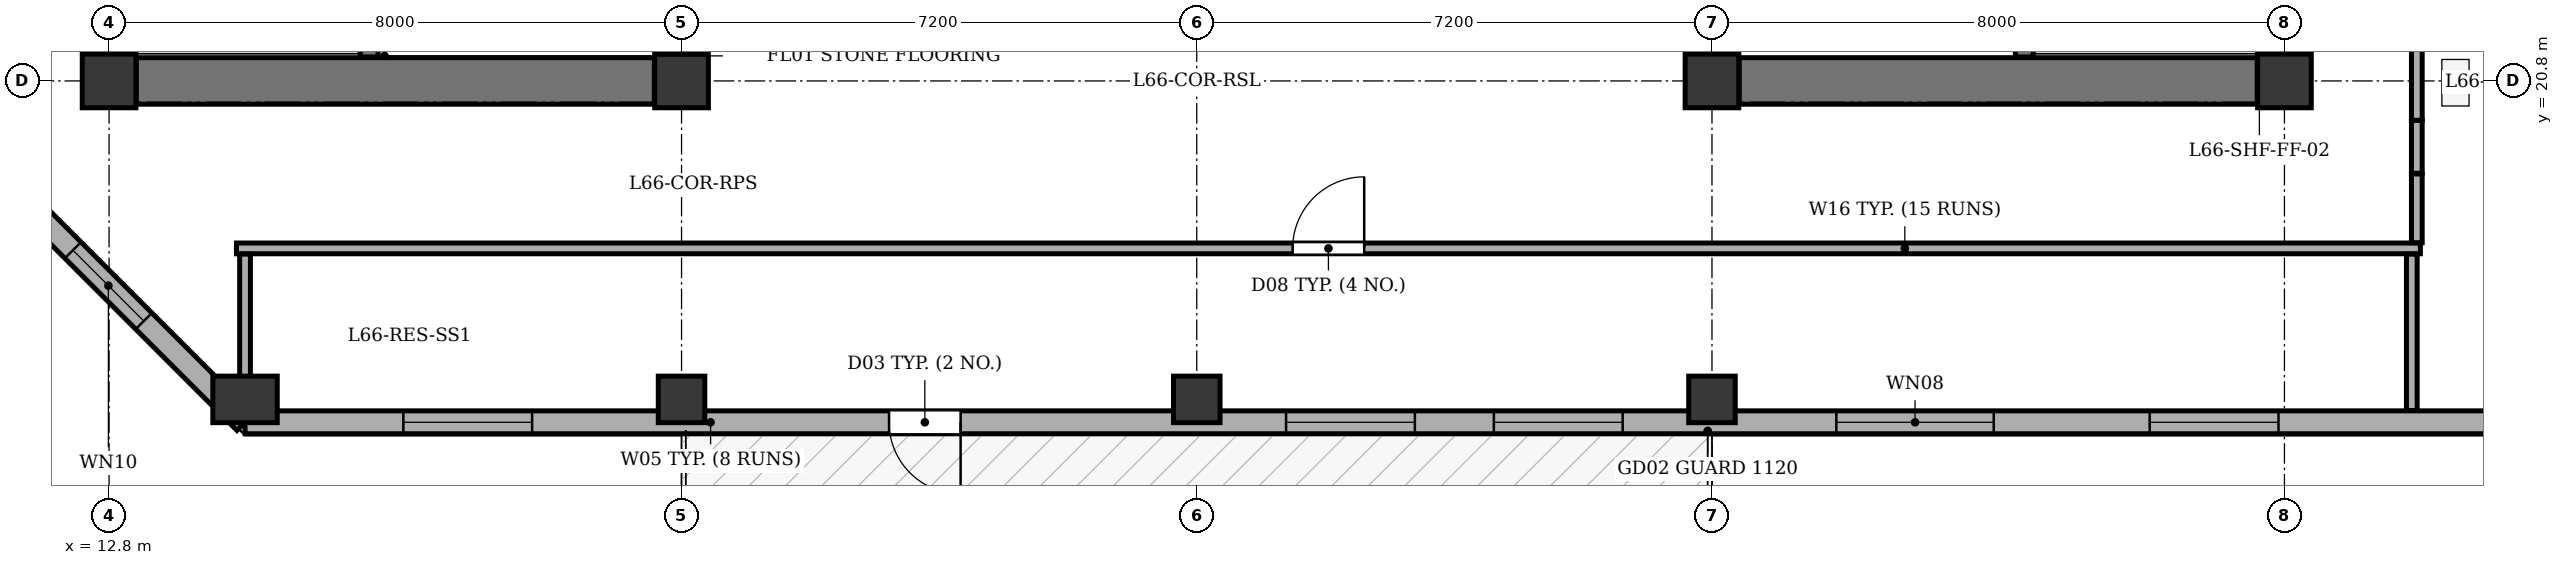
"""IFC4 building model, lengths in metres.
Left out: names, types, materials, properties, quantities, classifications, styles, units other than length and angle.
Written with IfcOpenShell. Run it as: python <this file> out.ifc"""

import sys

from ifc_helpers import new_model, si_unit, direction, frame, frame_2d, origin, origin_2d, place, context, subcontext, project, spatial, rectangle, extrude, element, fill, save


model = new_model("IFC4")
c1 = context("Model", 3, precision=1e-05, world=origin(), true_north=direction((0.0, 1.0)))
c2 = subcontext(c1, "Body", "Model", "MODEL_VIEW")
j1 = project(units=[si_unit("LENGTHUNIT", "METRE"), si_unit("PLANEANGLEUNIT", "RADIAN")], contexts=[c1])
p1 = place(None, origin())
s1 = spatial("IfcSite", under=j1, at=p1, CompositionType="ELEMENT")
p2 = place(p1, origin())
s2 = spatial("IfcBuilding", under=s1, at=p2, CompositionType="ELEMENT")
p3 = place(p2, frame((0.0, 0.0, 251.7)))
s3 = spatial("IfcBuildingStorey", under=s2, at=p3, CompositionType="ELEMENT", Elevation=251.7)
for number, where, z_axis, x_axis in (
    (1, (12.8, 20.8, 0.0), (0.0, 0.0, 1.0), (1.0, 0.0, 0.0)),
    (2, (20.8, 20.8, 0.0), (0.0, 0.0, 1.0), (1.0, 0.0, 0.0)),
    (3, (35.2, 20.8, 0.0), (0.0, 0.0, 1.0), (1.0, 0.0, 0.0)),
    (4, (43.2, 20.8, 0.0), (0.0, 0.0, 1.0), (1.0, 0.0, 0.0)),
):
    element("IfcColumn", number, at=place(p3, frame(where, z_axis=z_axis, x_axis=x_axis)), inside=s3, PredefinedType="COLUMN", context=c2, shape_type="SweptSolid", body=[
        extrude(rectangle(XDim=0.75, YDim=0.75, at=origin_2d()), origin(), (0.0, 0.0, 1.0), 3.4),
    ])
p4 = place(p3, frame((14.7, 16.35, 0.0), z_axis=(0.0, 0.0, 1.0), x_axis=(1.0, 0.0, 0.0)))
e5 = element("IfcColumn", 5, at=p4, inside=s3, PredefinedType="COLUMN", context=c2, shape_type="SweptSolid", body=[
    extrude(rectangle(XDim=0.65, YDim=0.9, at=origin_2d()), origin(), (0.0, 0.0, 1.0), 3.4),
])
for number, where, z_axis, x_axis in (
    (6, (20.8, 16.35, 0.0), (0.0, 0.0, 1.0), (1.0, 0.0, 0.0)),
    (7, (28.0, 16.35, 0.0), (0.0, 0.0, 1.0), (1.0, 0.0, 0.0)),
    (8, (35.2, 16.35, 0.0), (0.0, 0.0, 1.0), (1.0, 0.0, 0.0)),
):
    element("IfcColumn", number, at=place(p3, frame(where, z_axis=z_axis, x_axis=x_axis)), inside=s3, PredefinedType="COLUMN", context=c2, shape_type="SweptSolid", body=[
        extrude(rectangle(XDim=0.65, YDim=0.65, at=origin_2d()), origin(), (0.0, 0.0, 1.0), 3.4),
    ])
p5 = place(p3, frame((51.7, 16.03, 0.0), z_axis=(0.0, 0.0, 1.0), x_axis=(-1.0, 0.0, 0.0)))
e9 = element("IfcWall", 9, at=p5, inside=s3, PredefinedType="STANDARD", context=c2, shape_type="SweptSolid", body=[
    extrude(rectangle(XDim=37.0, YDim=0.32, at=frame_2d((18.5, 0.0))), origin(), (0.0, 0.0, 1.0), 2.725),
])
p6 = place(p5, frame((27.0, 0.0, 0.0)))
e10 = element("IfcOpeningElement", 10, at=p6, cuts=e9, PredefinedType="OPENING", context=c2, shape_type="SweptSolid", body=[
    extrude(rectangle(XDim=1.0, YDim=2.02, at=frame_2d((0.5, 1.01))), frame((0.0, 0.17, 0.0), z_axis=(0.0, -1.0, 0.0), x_axis=(1.0, 0.0, 0.0)), (0.0, 0.0, 1.0), 0.34),
])
p7 = place(p5, frame((1.235, 0.0, 0.75)))
e11 = element("IfcOpeningElement", 11, at=p7, cuts=e9, PredefinedType="OPENING", context=c2, shape_type="SweptSolid", body=[
    extrude(rectangle(XDim=1.8, YDim=1.7, at=frame_2d((0.9, 0.85))), frame((0.0, 0.17, 0.0), z_axis=(0.0, -1.0, 0.0), x_axis=(1.0, 0.0, 0.0)), (0.0, 0.0, 1.0), 0.34),
])
p8 = place(p5, frame((3.885, 0.0, 0.75)))
e12 = element("IfcOpeningElement", 12, at=p8, cuts=e9, PredefinedType="OPENING", context=c2, shape_type="SweptSolid", body=[
    extrude(rectangle(XDim=1.8, YDim=1.7, at=frame_2d((0.9, 0.85))), frame((0.0, 0.17, 0.0), z_axis=(0.0, -1.0, 0.0), x_axis=(1.0, 0.0, 0.0)), (0.0, 0.0, 1.0), 0.34),
])
p9 = place(p5, frame((8.583, 0.0, 0.75)))
e13 = element("IfcOpeningElement", 13, at=p9, cuts=e9, PredefinedType="OPENING", context=c2, shape_type="SweptSolid", body=[
    extrude(rectangle(XDim=1.8, YDim=1.7, at=frame_2d((0.9, 0.85))), frame((0.0, 0.17, 0.0), z_axis=(0.0, -1.0, 0.0), x_axis=(1.0, 0.0, 0.0)), (0.0, 0.0, 1.0), 0.34),
])
p10 = place(p5, frame((12.562, 0.0, 0.75)))
e14 = element("IfcOpeningElement", 14, at=p10, cuts=e9, PredefinedType="OPENING", context=c2, shape_type="SweptSolid", body=[
    extrude(rectangle(XDim=2.2, YDim=1.7, at=frame_2d((1.1, 0.85))), frame((0.0, 0.17, 0.0), z_axis=(0.0, -1.0, 0.0), x_axis=(1.0, 0.0, 0.0)), (0.0, 0.0, 1.0), 0.34),
])
p11 = place(p5, frame((17.748, 0.0, 0.75)))
e15 = element("IfcOpeningElement", 15, at=p11, cuts=e9, PredefinedType="OPENING", context=c2, shape_type="SweptSolid", body=[
    extrude(rectangle(XDim=1.8, YDim=1.7, at=frame_2d((0.9, 0.85))), frame((0.0, 0.17, 0.0), z_axis=(0.0, -1.0, 0.0), x_axis=(1.0, 0.0, 0.0)), (0.0, 0.0, 1.0), 0.34),
])
p12 = place(p5, frame((20.652, 0.0, 0.75)))
e16 = element("IfcOpeningElement", 16, at=p12, cuts=e9, PredefinedType="OPENING", context=c2, shape_type="SweptSolid", body=[
    extrude(rectangle(XDim=1.8, YDim=1.7, at=frame_2d((0.9, 0.85))), frame((0.0, 0.17, 0.0), z_axis=(0.0, -1.0, 0.0), x_axis=(1.0, 0.0, 0.0)), (0.0, 0.0, 1.0), 0.34),
])
p13 = place(p5, frame((32.988, 0.0, 0.75)))
e17 = element("IfcOpeningElement", 17, at=p13, cuts=e9, PredefinedType="OPENING", context=c2, shape_type="SweptSolid", body=[
    extrude(rectangle(XDim=1.8, YDim=1.7, at=frame_2d((0.9, 0.85))), frame((0.0, 0.17, 0.0), z_axis=(0.0, -1.0, 0.0), x_axis=(1.0, 0.0, 0.0)), (0.0, 0.0, 1.0), 0.34),
])
p14 = place(p3, frame((14.7, 16.03, 0.0), z_axis=(0.0, 0.0, 1.0), x_axis=(-0.707106781187, 0.707106781187, 0.0)))
e18 = element("IfcWall", 18, at=p14, inside=s3, PredefinedType="STANDARD", context=c2, shape_type="SweptSolid", body=[
    extrude(rectangle(XDim=5.402, YDim=0.32, at=frame_2d((2.701, 0.0))), origin(), (0.0, 0.0, 1.0), 2.725),
])
p15 = place(p14, frame((2.001, 0.0, 0.75)))
e19 = element("IfcOpeningElement", 19, at=p15, cuts=e18, PredefinedType="OPENING", context=c2, shape_type="SweptSolid", body=[
    extrude(rectangle(XDim=1.4, YDim=1.65, at=frame_2d((0.7, 0.825))), frame((0.0, 0.17, 0.0), z_axis=(0.0, -1.0, 0.0), x_axis=(1.0, 0.0, 0.0)), (0.0, 0.0, 1.0), 0.34),
])
p16 = place(p3, frame((12.8, 21.18, 0.0), z_axis=(0.0, 0.0, 1.0), x_axis=(0.0, 1.0, 0.0)))
e20 = element("IfcWall", 20, at=p16, inside=s3, PredefinedType="SHEAR", context=c2, shape_type="SweptSolid", body=[
    extrude(rectangle(XDim=12.04, YDim=0.65, at=frame_2d((6.02, 0.0))), origin(), (0.0, 0.0, 1.0), 3.1),
])
p17 = place(p3, frame((13.18, 20.8, 0.0), z_axis=(0.0, 0.0, 1.0), x_axis=(1.0, 0.0, 0.0)))
e21 = element("IfcWall", 21, at=p17, inside=s3, PredefinedType="SHEAR", context=c2, shape_type="SweptSolid", body=[
    extrude(rectangle(XDim=7.24, YDim=0.65, at=frame_2d((3.62, 0.0))), origin(), (0.0, 0.0, 1.0), 3.1),
])
p18 = place(p3, frame((20.8, 21.18, 0.0), z_axis=(0.0, 0.0, 1.0), x_axis=(0.0, 1.0, 0.0)))
e22 = element("IfcWall", 22, at=p18, inside=s3, PredefinedType="SHEAR", context=c2, shape_type="SweptSolid", body=[
    extrude(rectangle(XDim=3.87, YDim=0.65, at=frame_2d((1.935, 0.0))), origin(), (0.0, 0.0, 1.0), 3.1),
])
p19 = place(p18, frame((1.42, 0.0, 0.0)))
e23 = element("IfcOpeningElement", 23, at=p19, cuts=e22, PredefinedType="OPENING", context=c2, shape_type="SweptSolid", body=[
    extrude(rectangle(XDim=1.2, YDim=2.15, at=frame_2d((0.6, 1.075))), frame((0.0, 0.335, 0.0), z_axis=(0.0, -1.0, 0.0), x_axis=(1.0, 0.0, 0.0)), (0.0, 0.0, 1.0), 0.67),
])
p20 = place(p3, frame((16.435, 21.135, 0.0), z_axis=(0.0, 0.0, 1.0), x_axis=(0.0, 1.0, 0.0)))
e24 = element("IfcWall", 24, at=p20, inside=s3, PredefinedType="SHEAR", context=c2, shape_type="SweptSolid", body=[
    extrude(rectangle(XDim=12.13, YDim=0.25, at=frame_2d((6.065, 0.0))), origin(), (0.0, 0.0, 1.0), 3.1),
])
p21 = place(p20, frame((0.515, 0.0, 0.0)))
e25 = element("IfcOpeningElement", 25, at=p21, cuts=e24, PredefinedType="OPENING", context=c2, shape_type="SweptSolid", body=[
    extrude(rectangle(XDim=1.2, YDim=2.15, at=frame_2d((0.6, 1.075))), frame((0.0, 0.135, 0.0), z_axis=(0.0, -1.0, 0.0), x_axis=(1.0, 0.0, 0.0)), (0.0, 0.0, 1.0), 0.27),
])
p22 = place(p20, frame((2.665, 0.0, 0.0)))
e26 = element("IfcOpeningElement", 26, at=p22, cuts=e24, PredefinedType="OPENING", context=c2, shape_type="SweptSolid", body=[
    extrude(rectangle(XDim=1.15, YDim=2.15, at=frame_2d((0.575, 1.075))), frame((0.0, 0.135, 0.0), z_axis=(0.0, -1.0, 0.0), x_axis=(1.0, 0.0, 0.0)), (0.0, 0.0, 1.0), 0.27),
])
p23 = place(p3, frame((43.2, 21.18, 0.0), z_axis=(0.0, 0.0, 1.0), x_axis=(0.0, 1.0, 0.0)))
e27 = element("IfcWall", 27, at=p23, inside=s3, PredefinedType="SHEAR", context=c2, shape_type="SweptSolid", body=[
    extrude(rectangle(XDim=12.04, YDim=0.65, at=frame_2d((6.02, 0.0))), origin(), (0.0, 0.0, 1.0), 3.1),
])
p24 = place(p3, frame((35.58, 20.8, 0.0), z_axis=(0.0, 0.0, 1.0), x_axis=(1.0, 0.0, 0.0)))
e28 = element("IfcWall", 28, at=p24, inside=s3, PredefinedType="SHEAR", context=c2, shape_type="SweptSolid", body=[
    extrude(rectangle(XDim=7.24, YDim=0.65, at=frame_2d((3.62, 0.0))), origin(), (0.0, 0.0, 1.0), 3.1),
])
p25 = place(p3, frame((35.2, 21.18, 0.0), z_axis=(0.0, 0.0, 1.0), x_axis=(0.0, 1.0, 0.0)))
e29 = element("IfcWall", 29, at=p25, inside=s3, PredefinedType="SHEAR", context=c2, shape_type="SweptSolid", body=[
    extrude(rectangle(XDim=3.87, YDim=0.65, at=frame_2d((1.935, 0.0))), origin(), (0.0, 0.0, 1.0), 3.1),
])
p26 = place(p25, frame((1.42, 0.0, 0.0)))
e30 = element("IfcOpeningElement", 30, at=p26, cuts=e29, PredefinedType="OPENING", context=c2, shape_type="SweptSolid", body=[
    extrude(rectangle(XDim=1.2, YDim=2.15, at=frame_2d((0.6, 1.075))), frame((0.0, 0.335, 0.0), z_axis=(0.0, -1.0, 0.0), x_axis=(1.0, 0.0, 0.0)), (0.0, 0.0, 1.0), 0.67),
])
p27 = place(p3, frame((39.565, 21.135, 0.0), z_axis=(0.0, 0.0, 1.0), x_axis=(0.0, 1.0, 0.0)))
e31 = element("IfcWall", 31, at=p27, inside=s3, PredefinedType="SHEAR", context=c2, shape_type="SweptSolid", body=[
    extrude(rectangle(XDim=12.13, YDim=0.25, at=frame_2d((6.065, 0.0))), origin(), (0.0, 0.0, 1.0), 3.1),
])
p28 = place(p27, frame((0.515, 0.0, 0.0)))
e32 = element("IfcOpeningElement", 32, at=p28, cuts=e31, PredefinedType="OPENING", context=c2, shape_type="SweptSolid", body=[
    extrude(rectangle(XDim=1.2, YDim=2.15, at=frame_2d((0.6, 1.075))), frame((0.0, 0.135, 0.0), z_axis=(0.0, -1.0, 0.0), x_axis=(1.0, 0.0, 0.0)), (0.0, 0.0, 1.0), 0.27),
])
p29 = place(p27, frame((2.665, 0.0, 0.0)))
e33 = element("IfcOpeningElement", 33, at=p29, cuts=e31, PredefinedType="OPENING", context=c2, shape_type="SweptSolid", body=[
    extrude(rectangle(XDim=1.15, YDim=2.15, at=frame_2d((0.575, 1.075))), frame((0.0, 0.135, 0.0), z_axis=(0.0, -1.0, 0.0), x_axis=(1.0, 0.0, 0.0)), (0.0, 0.0, 1.0), 0.27),
])
p30 = place(p3, frame((14.58, 18.46, 0.0), z_axis=(0.0, 0.0, 1.0), x_axis=(1.0, 0.0, 0.0)))
e34 = element("IfcWall", 34, at=p30, inside=s3, PredefinedType="PARTITIONING", context=c2, shape_type="SweptSolid", body=[
    extrude(rectangle(XDim=30.52, YDim=0.15, at=frame_2d((15.26, 0.0))), origin(), (0.0, 0.0, 1.0), 3.1),
])
p31 = place(p30, frame((14.76, 0.0, 0.0)))
e35 = element("IfcOpeningElement", 35, at=p31, cuts=e34, PredefinedType="OPENING", context=c2, shape_type="SweptSolid", body=[
    extrude(rectangle(XDim=1.0, YDim=2.1, at=frame_2d((0.5, 1.05))), frame((0.0, 0.085, 0.0), z_axis=(0.0, -1.0, 0.0), x_axis=(1.0, 0.0, 0.0)), (0.0, 0.0, 1.0), 0.17),
])
p32 = place(p3, frame((14.7, 16.195, 0.0), z_axis=(0.0, 0.0, 1.0), x_axis=(0.0, 1.0, 0.0)))
e36 = element("IfcWall", 36, at=p32, inside=s3, PredefinedType="PARTITIONING", context=c2, shape_type="SweptSolid", body=[
    extrude(rectangle(XDim=2.185, YDim=0.15, at=frame_2d((1.092, 0.0))), origin(), (0.0, 0.0, 1.0), 3.1),
])
p33 = place(p3, frame((44.98, 16.195, 0.0), z_axis=(0.0, 0.0, 1.0), x_axis=(0.0, 1.0, 0.0)))
e37 = element("IfcWall", 37, at=p33, inside=s3, PredefinedType="PARTITIONING", context=c2, shape_type="SweptSolid", body=[
    extrude(rectangle(XDim=2.185, YDim=0.15, at=frame_2d((1.092, 0.0))), origin(), (0.0, 0.0, 1.0), 2.725),
])
p34 = place(p3, frame((45.05, 19.5, 0.0), z_axis=(0.0, 0.0, 1.0), x_axis=(0.0, -1.0, 0.0)))
e38 = element("IfcWall", 38, at=p34, inside=s3, PredefinedType="PARTITIONING", context=c2, shape_type="SweptSolid", body=[
    extrude(rectangle(XDim=0.96, YDim=0.15, at=frame_2d((0.48, 0.0))), origin(), (0.0, 0.0, 1.0), 2.725),
])
p35 = place(p3, frame((45.05, 19.51, 0.0), z_axis=(0.0, 0.0, 1.0), x_axis=(0.0, 1.0, 0.0)))
e39 = element("IfcWall", 39, at=p35, inside=s3, PredefinedType="PARTITIONING", context=c2, shape_type="SweptSolid", body=[
    extrude(rectangle(XDim=0.74, YDim=0.15, at=frame_2d((0.37, 0.0))), origin(), (0.0, 0.0, 1.0), 2.725),
])
p36 = place(p3, frame((45.05, 20.25, 0.0), z_axis=(0.0, 0.0, 1.0), x_axis=(0.0, 1.0, 0.0)))
e40 = element("IfcWall", 40, at=p36, inside=s3, PredefinedType="PARTITIONING", context=c2, shape_type="SweptSolid", body=[
    extrude(rectangle(XDim=13.9, YDim=0.15, at=frame_2d((6.95, 0.0))), origin(), (0.0, 0.0, 1.0), 2.725),
])
p37 = place(p6, origin())
e41 = element("IfcDoor", 41, at=p37, inside=s3, OperationType="SINGLE_SWING_LEFT", PredefinedType="DOOR", context=c2, shape_type="SweptSolid", body=[
    extrude(rectangle(XDim=1.0, YDim=2.02, at=frame_2d((0.5, 1.01))), frame((0.0, 0.025, 0.0), z_axis=(0.0, -1.0, 0.0), x_axis=(1.0, 0.0, 0.0)), (0.0, 0.0, 1.0), 0.05),
])
fill(e10, e41)
p38 = place(p9, origin())
e42 = element("IfcWindow", 42, at=p38, inside=s3, PartitioningType="SINGLE_PANEL", PredefinedType="WINDOW", context=c2, shape_type="SweptSolid", body=[
    extrude(rectangle(XDim=1.8, YDim=1.7, at=frame_2d((0.9, 0.85))), frame((0.0, -0.01, 0.0), z_axis=(0.0, -1.0, 0.0), x_axis=(1.0, 0.0, 0.0)), (0.0, 0.0, 1.0), 0.06),
])
fill(e13, e42)
p39 = place(p10, origin())
e43 = element("IfcWindow", 43, at=p39, inside=s3, PartitioningType="SINGLE_PANEL", PredefinedType="WINDOW", context=c2, shape_type="SweptSolid", body=[
    extrude(rectangle(XDim=2.2, YDim=1.7, at=frame_2d((1.1, 0.85))), frame((0.0, -0.01, 0.0), z_axis=(0.0, -1.0, 0.0), x_axis=(1.0, 0.0, 0.0)), (0.0, 0.0, 1.0), 0.06),
])
fill(e14, e43)
p40 = place(p11, origin())
e44 = element("IfcWindow", 44, at=p40, inside=s3, PartitioningType="SINGLE_PANEL", PredefinedType="WINDOW", context=c2, shape_type="SweptSolid", body=[
    extrude(rectangle(XDim=1.8, YDim=1.7, at=frame_2d((0.9, 0.85))), frame((0.0, -0.01, 0.0), z_axis=(0.0, -1.0, 0.0), x_axis=(1.0, 0.0, 0.0)), (0.0, 0.0, 1.0), 0.06),
])
fill(e15, e44)
p41 = place(p12, origin())
e45 = element("IfcWindow", 45, at=p41, inside=s3, PartitioningType="SINGLE_PANEL", PredefinedType="WINDOW", context=c2, shape_type="SweptSolid", body=[
    extrude(rectangle(XDim=1.8, YDim=1.7, at=frame_2d((0.9, 0.85))), frame((0.0, -0.01, 0.0), z_axis=(0.0, -1.0, 0.0), x_axis=(1.0, 0.0, 0.0)), (0.0, 0.0, 1.0), 0.06),
])
fill(e16, e45)
p42 = place(p13, origin())
e46 = element("IfcWindow", 46, at=p42, inside=s3, PartitioningType="SINGLE_PANEL", PredefinedType="WINDOW", context=c2, shape_type="SweptSolid", body=[
    extrude(rectangle(XDim=1.8, YDim=1.7, at=frame_2d((0.9, 0.85))), frame((0.0, -0.01, 0.0), z_axis=(0.0, -1.0, 0.0), x_axis=(1.0, 0.0, 0.0)), (0.0, 0.0, 1.0), 0.06),
])
fill(e17, e46)
p43 = place(p15, origin())
e47 = element("IfcWindow", 47, at=p43, inside=s3, PartitioningType="SINGLE_PANEL", PredefinedType="WINDOW", context=c2, shape_type="SweptSolid", body=[
    extrude(rectangle(XDim=1.4, YDim=1.65, at=frame_2d((0.7, 0.825))), frame((0.0, -0.01, 0.0), z_axis=(0.0, -1.0, 0.0), x_axis=(1.0, 0.0, 0.0)), (0.0, 0.0, 1.0), 0.06),
])
fill(e19, e47)
p44 = place(p31, origin())
e48 = element("IfcDoor", 48, at=p44, inside=s3, OperationType="SINGLE_SWING_RIGHT", PredefinedType="DOOR", context=c2, shape_type="SweptSolid", body=[
    extrude(rectangle(XDim=1.0, YDim=2.1, at=frame_2d((0.5, 1.05))), frame((0.0, 0.025, 0.0), z_axis=(0.0, -1.0, 0.0), x_axis=(1.0, 0.0, 0.0)), (0.0, 0.0, 1.0), 0.05),
])
fill(e35, e48)
save(model, sys.argv[1])
